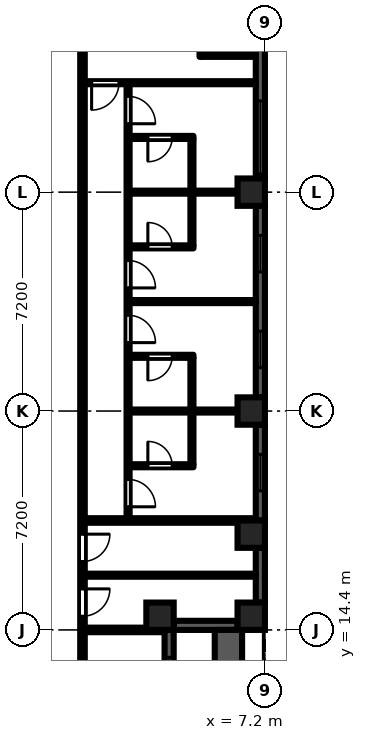
"""IFC4 building model, lengths in metres.
Left out: names, types, materials, properties, quantities, classifications, styles, units other than length and angle.
Written with IfcOpenShell. Run it as: python <this file> out.ifc"""

import sys

from ifc_helpers import new_model, si_unit, direction, frame, frame_2d, origin, origin_2d, place, context, subcontext, project, spatial, rectangle, extrude, element, fill, save


model = new_model("IFC4")
c1 = context("Model", 3, precision=1e-05, world=origin(), true_north=direction((0.0, 1.0)))
c2 = subcontext(c1, "Body", "Model", "MODEL_VIEW")
j1 = project(units=[si_unit("LENGTHUNIT", "METRE"), si_unit("PLANEANGLEUNIT", "RADIAN")], contexts=[c1])
p1 = place(None, origin())
s1 = spatial("IfcSite", under=j1, at=p1, CompositionType="ELEMENT")
p2 = place(p1, origin())
s2 = spatial("IfcBuilding", under=s1, at=p2, CompositionType="ELEMENT")
p3 = place(p2, frame((0.0, 0.0, 59.7)))
s3 = spatial("IfcBuildingStorey", under=s2, at=p3, CompositionType="ELEMENT", Elevation=59.7)
for number, where, z_axis, x_axis in (
    (1, (3.75, 14.85, 0.0), (0.0, 0.0, 1.0), (1.0, 0.0, 0.0)),
    (2, (6.75, 14.85, 0.0), (0.0, 0.0, 1.0), (1.0, 0.0, 0.0)),
    (3, (6.75, 17.55, 0.0), (0.0, 0.0, 1.0), (1.0, 0.0, 0.0)),
    (4, (6.75, 21.6, 0.0), (0.0, 0.0, 1.0), (1.0, 0.0, 0.0)),
    (5, (6.75, 28.8, 0.0), (0.0, 0.0, 1.0), (1.0, 0.0, 0.0)),
):
    element("IfcColumn", number, at=place(p3, frame(where, z_axis=z_axis, x_axis=x_axis)), inside=s3, PredefinedType="COLUMN", context=c2, shape_type="SweptSolid", body=[
        extrude(rectangle(XDim=0.9, YDim=0.9, at=origin_2d()), origin(), (0.0, 0.0, 1.0), 3.0),
    ])
p4 = place(p3, frame((4.05, 7.2, 0.0), z_axis=(0.0, 0.0, 1.0), x_axis=(0.0, 1.0, 0.0)))
e6 = element("IfcWall", 6, at=p4, inside=s3, PredefinedType="SOLIDWALL", context=c2, shape_type="SweptSolid", body=[
    extrude(rectangle(XDim=7.2, YDim=0.3, at=frame_2d((3.6, 0.0))), origin(), (0.0, 0.0, 1.0), 2.55),
])
p5 = place(p4, frame((3.0, 0.0, 0.0)))
e7 = element("IfcOpeningElement", 7, at=p5, cuts=e6, PredefinedType="OPENING", context=c2, shape_type="SweptSolid", body=[
    extrude(rectangle(XDim=1.2, YDim=2.05, at=frame_2d((0.6, 1.025))), frame((0.0, 0.16, 0.0), z_axis=(0.0, -1.0, 0.0), x_axis=(1.0, 0.0, 0.0)), (0.0, 0.0, 1.0), 0.32),
])
p6 = place(p4, frame((0.9, 0.0, 0.2)))
e8 = element("IfcOpeningElement", 8, at=p6, cuts=e6, PredefinedType="OPENING", context=c2, shape_type="SweptSolid", body=[
    extrude(rectangle(XDim=1.8, YDim=1.85, at=frame_2d((0.9, 0.925))), frame((0.0, 0.16, 0.0), z_axis=(0.0, -1.0, 0.0), x_axis=(1.0, 0.0, 0.0)), (0.0, 0.0, 1.0), 0.32),
])
p7 = place(p4, frame((4.5, 0.0, 0.2)))
e9 = element("IfcOpeningElement", 9, at=p7, cuts=e6, PredefinedType="OPENING", context=c2, shape_type="SweptSolid", body=[
    extrude(rectangle(XDim=1.8, YDim=1.85, at=frame_2d((0.9, 0.925))), frame((0.0, 0.16, 0.0), z_axis=(0.0, -1.0, 0.0), x_axis=(1.0, 0.0, 0.0)), (0.0, 0.0, 1.0), 0.32),
])
p8 = place(p3, frame((4.2, 14.55, 0.0), z_axis=(0.0, 0.0, 1.0), x_axis=(1.0, 0.0, 0.0)))
e10 = element("IfcWall", 10, at=p8, inside=s3, PredefinedType="SOLIDWALL", context=c2, shape_type="SweptSolid", body=[
    extrude(rectangle(XDim=2.1, YDim=0.3, at=frame_2d((1.05, 0.0))), origin(), (0.0, 0.0, 1.0), 2.55),
])
p9 = place(p3, frame((7.05, 15.3, 0.0), z_axis=(0.0, 0.0, 1.0), x_axis=(0.0, 1.0, 0.0)))
e11 = element("IfcWall", 11, at=p9, inside=s3, PredefinedType="SOLIDWALL", context=c2, shape_type="SweptSolid", body=[
    extrude(rectangle(XDim=1.8, YDim=0.3, at=frame_2d((0.9, 0.0))), origin(), (0.0, 0.0, 1.0), 2.1),
])
p10 = place(p3, frame((7.05, 18.0, 0.0), z_axis=(0.0, 0.0, 1.0), x_axis=(0.0, 1.0, 0.0)))
e12 = element("IfcWall", 12, at=p10, inside=s3, PredefinedType="SOLIDWALL", context=c2, shape_type="SweptSolid", body=[
    extrude(rectangle(XDim=3.15, YDim=0.3, at=frame_2d((1.575, 0.0))), origin(), (0.0, 0.0, 1.0), 2.1),
])
p11 = place(p10, frame((0.975, 0.0, 0.2)))
e13 = element("IfcOpeningElement", 13, at=p11, cuts=e12, PredefinedType="OPENING", context=c2, shape_type="SweptSolid", body=[
    extrude(rectangle(XDim=1.2, YDim=1.85, at=frame_2d((0.6, 0.925))), frame((0.0, 0.16, 0.0), z_axis=(0.0, -1.0, 0.0), x_axis=(1.0, 0.0, 0.0)), (0.0, 0.0, 1.0), 0.32),
])
p12 = place(p3, frame((7.05, 22.05, 0.0), z_axis=(0.0, 0.0, 1.0), x_axis=(0.0, 1.0, 0.0)))
e14 = element("IfcWall", 14, at=p12, inside=s3, PredefinedType="SOLIDWALL", context=c2, shape_type="SweptSolid", body=[
    extrude(rectangle(XDim=6.3, YDim=0.3, at=frame_2d((3.15, 0.0))), origin(), (0.0, 0.0, 1.0), 2.1),
])
p13 = place(p12, frame((0.975, 0.0, 0.2)))
e15 = element("IfcOpeningElement", 15, at=p13, cuts=e14, PredefinedType="OPENING", context=c2, shape_type="SweptSolid", body=[
    extrude(rectangle(XDim=1.2, YDim=1.85, at=frame_2d((0.6, 0.925))), frame((0.0, 0.16, 0.0), z_axis=(0.0, -1.0, 0.0), x_axis=(1.0, 0.0, 0.0)), (0.0, 0.0, 1.0), 0.32),
])
p14 = place(p12, frame((4.125, 0.0, 0.2)))
e16 = element("IfcOpeningElement", 16, at=p14, cuts=e14, PredefinedType="OPENING", context=c2, shape_type="SweptSolid", body=[
    extrude(rectangle(XDim=1.2, YDim=1.85, at=frame_2d((0.6, 0.925))), frame((0.0, 0.16, 0.0), z_axis=(0.0, -1.0, 0.0), x_axis=(1.0, 0.0, 0.0)), (0.0, 0.0, 1.0), 0.32),
])
p15 = place(p3, frame((7.05, 29.25, 0.0), z_axis=(0.0, 0.0, 1.0), x_axis=(0.0, 1.0, 0.0)))
e17 = element("IfcWall", 17, at=p15, inside=s3, PredefinedType="SOLIDWALL", context=c2, shape_type="SweptSolid", body=[
    extrude(rectangle(XDim=6.3, YDim=0.3, at=frame_2d((3.15, 0.0))), origin(), (0.0, 0.0, 1.0), 2.1),
])
p16 = place(p15, frame((0.15, 0.0, 0.2)))
e18 = element("IfcOpeningElement", 18, at=p16, cuts=e17, PredefinedType="OPENING", context=c2, shape_type="SweptSolid", body=[
    extrude(rectangle(XDim=2.4, YDim=1.85, at=frame_2d((1.2, 0.925))), frame((0.0, 0.16, 0.0), z_axis=(0.0, -1.0, 0.0), x_axis=(1.0, 0.0, 0.0)), (0.0, 0.0, 1.0), 0.32),
])
p17 = place(p3, frame((6.0, 7.2, 0.0), z_axis=(0.0, 0.0, 1.0), x_axis=(0.0, 1.0, 0.0)))
e19 = element("IfcWall", 19, at=p17, inside=s3, PredefinedType="PARAPET", context=c2, shape_type="SweptSolid", body=[
    extrude(rectangle(XDim=7.2, YDim=0.9, at=frame_2d((3.6, 0.0))), origin(), (0.0, 0.0, 1.0), 0.8),
])
p18 = place(p3, frame((1.2, 1.125, 0.0), z_axis=(0.0, 0.0, 1.0), x_axis=(0.0, 1.0, 0.0)))
e20 = element("IfcWall", 20, at=p18, inside=s3, PredefinedType="PARTITIONING", context=c2, shape_type="SweptSolid", body=[
    extrude(rectangle(XDim=35.375, YDim=0.15, at=frame_2d((17.688, 0.0))), origin(), (0.0, 0.0, 1.0), 2.55),
])
p19 = place(p18, frame((2.625, 0.0, 0.0)))
e21 = element("IfcOpeningElement", 21, at=p19, cuts=e20, PredefinedType="OPENING", context=c2, shape_type="SweptSolid", body=[
    extrude(rectangle(XDim=0.9, YDim=2.1, at=frame_2d((0.45, 1.05))), frame((0.0, 0.085, 0.0), z_axis=(0.0, -1.0, 0.0), x_axis=(1.0, 0.0, 0.0)), (0.0, 0.0, 1.0), 0.17),
])
p20 = place(p18, frame((7.425, 0.0, 0.0)))
e22 = element("IfcOpeningElement", 22, at=p20, cuts=e20, PredefinedType="OPENING", context=c2, shape_type="SweptSolid", body=[
    extrude(rectangle(XDim=0.9, YDim=2.1, at=frame_2d((0.45, 1.05))), frame((0.0, 0.085, 0.0), z_axis=(0.0, -1.0, 0.0), x_axis=(1.0, 0.0, 0.0)), (0.0, 0.0, 1.0), 0.17),
])
p21 = place(p18, frame((13.725, 0.0, 0.0)))
e23 = element("IfcOpeningElement", 23, at=p21, cuts=e20, PredefinedType="OPENING", context=c2, shape_type="SweptSolid", body=[
    extrude(rectangle(XDim=0.9, YDim=2.1, at=frame_2d((0.45, 1.05))), frame((0.0, 0.085, 0.0), z_axis=(0.0, -1.0, 0.0), x_axis=(1.0, 0.0, 0.0)), (0.0, 0.0, 1.0), 0.17),
])
p22 = place(p18, frame((15.525, 0.0, 0.0)))
e24 = element("IfcOpeningElement", 24, at=p22, cuts=e20, PredefinedType="OPENING", context=c2, shape_type="SweptSolid", body=[
    extrude(rectangle(XDim=0.9, YDim=2.1, at=frame_2d((0.45, 1.05))), frame((0.0, 0.085, 0.0), z_axis=(0.0, -1.0, 0.0), x_axis=(1.0, 0.0, 0.0)), (0.0, 0.0, 1.0), 0.17),
])
p23 = place(p18, frame((32.825, 0.0, 0.0)))
e25 = element("IfcOpeningElement", 25, at=p23, cuts=e20, PredefinedType="OPENING", context=c2, shape_type="SweptSolid", body=[
    extrude(rectangle(XDim=1.0, YDim=2.1, at=frame_2d((0.5, 1.05))), frame((0.0, 0.085, 0.0), z_axis=(0.0, -1.0, 0.0), x_axis=(1.0, 0.0, 0.0)), (0.0, 0.0, 1.0), 0.17),
])
p24 = place(p3, frame((1.275, 14.4, 0.0), z_axis=(0.0, 0.0, 1.0), x_axis=(1.0, 0.0, 0.0)))
e26 = element("IfcWall", 26, at=p24, inside=s3, PredefinedType="PARTITIONING", context=c2, shape_type="SweptSolid", body=[
    extrude(rectangle(XDim=2.625, YDim=0.15, at=frame_2d((1.312, 0.0))), origin(), (0.0, 0.0, 1.0), 2.55),
])
p25 = place(p3, frame((1.275, 16.2, 0.0), z_axis=(0.0, 0.0, 1.0), x_axis=(1.0, 0.0, 0.0)))
e27 = element("IfcWall", 27, at=p25, inside=s3, PredefinedType="PARTITIONING", context=c2, shape_type="SweptSolid", body=[
    extrude(rectangle(XDim=5.625, YDim=0.1, at=frame_2d((2.812, 0.0))), origin(), (0.0, 0.0, 1.0), 2.55),
])
p26 = place(p3, frame((1.275, 18.0, 0.0), z_axis=(0.0, 0.0, 1.0), x_axis=(1.0, 0.0, 0.0)))
e28 = element("IfcWall", 28, at=p26, inside=s3, PredefinedType="PARTITIONING", context=c2, shape_type="SweptSolid", body=[
    extrude(rectangle(XDim=5.625, YDim=0.15, at=frame_2d((2.812, 0.0))), origin(), (0.0, 0.0, 1.0), 2.55),
])
p27 = place(p3, frame((1.275, 32.4, 0.0), z_axis=(0.0, 0.0, 1.0), x_axis=(1.0, 0.0, 0.0)))
e29 = element("IfcWall", 29, at=p27, inside=s3, PredefinedType="PARTITIONING", context=c2, shape_type="SweptSolid", body=[
    extrude(rectangle(XDim=5.625, YDim=0.1, at=frame_2d((2.812, 0.0))), origin(), (0.0, 0.0, 1.0), 2.55),
])
p28 = place(p27, frame((0.225, 0.0, 0.0)))
e30 = element("IfcOpeningElement", 30, at=p28, cuts=e29, PredefinedType="OPENING", context=c2, shape_type="SweptSolid", body=[
    extrude(rectangle(XDim=0.9, YDim=2.1, at=frame_2d((0.45, 1.05))), frame((0.0, 0.06, 0.0), z_axis=(0.0, -1.0, 0.0), x_axis=(1.0, 0.0, 0.0)), (0.0, 0.0, 1.0), 0.12),
])
p29 = place(p3, frame((2.7, 18.075, 0.0), z_axis=(0.0, 0.0, 1.0), x_axis=(0.0, 1.0, 0.0)))
e31 = element("IfcWall", 31, at=p29, inside=s3, PredefinedType="PARTITIONING", context=c2, shape_type="SweptSolid", body=[
    extrude(rectangle(XDim=14.275, YDim=0.1, at=frame_2d((7.138, 0.0))), origin(), (0.0, 0.0, 1.0), 2.55),
])
p30 = place(p29, frame((0.375, 0.0, 0.0)))
e32 = element("IfcOpeningElement", 32, at=p30, cuts=e31, PredefinedType="OPENING", context=c2, shape_type="SweptSolid", body=[
    extrude(rectangle(XDim=0.9, YDim=2.1, at=frame_2d((0.45, 1.05))), frame((0.0, 0.06, 0.0), z_axis=(0.0, -1.0, 0.0), x_axis=(1.0, 0.0, 0.0)), (0.0, 0.0, 1.0), 0.12),
])
p31 = place(p29, frame((5.775, 0.0, 0.0)))
e33 = element("IfcOpeningElement", 33, at=p31, cuts=e31, PredefinedType="OPENING", context=c2, shape_type="SweptSolid", body=[
    extrude(rectangle(XDim=0.9, YDim=2.1, at=frame_2d((0.45, 1.05))), frame((0.0, 0.06, 0.0), z_axis=(0.0, -1.0, 0.0), x_axis=(1.0, 0.0, 0.0)), (0.0, 0.0, 1.0), 0.12),
])
p32 = place(p29, frame((7.575, 0.0, 0.0)))
e34 = element("IfcOpeningElement", 34, at=p32, cuts=e31, PredefinedType="OPENING", context=c2, shape_type="SweptSolid", body=[
    extrude(rectangle(XDim=0.9, YDim=2.1, at=frame_2d((0.45, 1.05))), frame((0.0, 0.06, 0.0), z_axis=(0.0, -1.0, 0.0), x_axis=(1.0, 0.0, 0.0)), (0.0, 0.0, 1.0), 0.12),
])
p33 = place(p29, frame((12.975, 0.0, 0.0)))
e35 = element("IfcOpeningElement", 35, at=p33, cuts=e31, PredefinedType="OPENING", context=c2, shape_type="SweptSolid", body=[
    extrude(rectangle(XDim=0.9, YDim=2.1, at=frame_2d((0.45, 1.05))), frame((0.0, 0.06, 0.0), z_axis=(0.0, -1.0, 0.0), x_axis=(1.0, 0.0, 0.0)), (0.0, 0.0, 1.0), 0.12),
])
p34 = place(p3, frame((2.75, 19.8, 0.0), z_axis=(0.0, 0.0, 1.0), x_axis=(1.0, 0.0, 0.0)))
e36 = element("IfcWall", 36, at=p34, inside=s3, PredefinedType="PARTITIONING", context=c2, shape_type="SweptSolid", body=[
    extrude(rectangle(XDim=2.1, YDim=0.1, at=frame_2d((1.05, 0.0))), origin(), (0.0, 0.0, 1.0), 2.55),
])
p35 = place(p34, frame((0.6, 0.0, 0.0)))
e37 = element("IfcOpeningElement", 37, at=p35, cuts=e36, PredefinedType="OPENING", context=c2, shape_type="SweptSolid", body=[
    extrude(rectangle(XDim=0.8, YDim=2.1, at=frame_2d((0.4, 1.05))), frame((0.0, 0.06, 0.0), z_axis=(0.0, -1.0, 0.0), x_axis=(1.0, 0.0, 0.0)), (0.0, 0.0, 1.0), 0.12),
])
p36 = place(p3, frame((2.75, 21.6, 0.0), z_axis=(0.0, 0.0, 1.0), x_axis=(1.0, 0.0, 0.0)))
e38 = element("IfcWall", 38, at=p36, inside=s3, PredefinedType="PARTITIONING", context=c2, shape_type="SweptSolid", body=[
    extrude(rectangle(XDim=4.15, YDim=0.1, at=frame_2d((2.075, 0.0))), origin(), (0.0, 0.0, 1.0), 2.55),
])
p37 = place(p3, frame((2.75, 23.4, 0.0), z_axis=(0.0, 0.0, 1.0), x_axis=(1.0, 0.0, 0.0)))
e39 = element("IfcWall", 39, at=p37, inside=s3, PredefinedType="PARTITIONING", context=c2, shape_type="SweptSolid", body=[
    extrude(rectangle(XDim=2.1, YDim=0.1, at=frame_2d((1.05, 0.0))), origin(), (0.0, 0.0, 1.0), 2.55),
])
p38 = place(p37, frame((0.6, 0.0, 0.0)))
e40 = element("IfcOpeningElement", 40, at=p38, cuts=e39, PredefinedType="OPENING", context=c2, shape_type="SweptSolid", body=[
    extrude(rectangle(XDim=0.8, YDim=2.1, at=frame_2d((0.4, 1.05))), frame((0.0, 0.06, 0.0), z_axis=(0.0, -1.0, 0.0), x_axis=(1.0, 0.0, 0.0)), (0.0, 0.0, 1.0), 0.12),
])
p39 = place(p3, frame((2.75, 25.2, 0.0), z_axis=(0.0, 0.0, 1.0), x_axis=(1.0, 0.0, 0.0)))
e41 = element("IfcWall", 41, at=p39, inside=s3, PredefinedType="PARTITIONING", context=c2, shape_type="SweptSolid", body=[
    extrude(rectangle(XDim=4.15, YDim=0.1, at=frame_2d((2.075, 0.0))), origin(), (0.0, 0.0, 1.0), 2.55),
])
p40 = place(p3, frame((2.75, 27.0, 0.0), z_axis=(0.0, 0.0, 1.0), x_axis=(1.0, 0.0, 0.0)))
e42 = element("IfcWall", 42, at=p40, inside=s3, PredefinedType="PARTITIONING", context=c2, shape_type="SweptSolid", body=[
    extrude(rectangle(XDim=2.1, YDim=0.1, at=frame_2d((1.05, 0.0))), origin(), (0.0, 0.0, 1.0), 2.55),
])
p41 = place(p40, frame((0.6, 0.0, 0.0)))
e43 = element("IfcOpeningElement", 43, at=p41, cuts=e42, PredefinedType="OPENING", context=c2, shape_type="SweptSolid", body=[
    extrude(rectangle(XDim=0.8, YDim=2.1, at=frame_2d((0.4, 1.05))), frame((0.0, 0.06, 0.0), z_axis=(0.0, -1.0, 0.0), x_axis=(1.0, 0.0, 0.0)), (0.0, 0.0, 1.0), 0.12),
])
p42 = place(p3, frame((2.75, 28.8, 0.0), z_axis=(0.0, 0.0, 1.0), x_axis=(1.0, 0.0, 0.0)))
e44 = element("IfcWall", 44, at=p42, inside=s3, PredefinedType="PARTITIONING", context=c2, shape_type="SweptSolid", body=[
    extrude(rectangle(XDim=4.15, YDim=0.1, at=frame_2d((2.075, 0.0))), origin(), (0.0, 0.0, 1.0), 2.55),
])
p43 = place(p3, frame((2.75, 30.6, 0.0), z_axis=(0.0, 0.0, 1.0), x_axis=(1.0, 0.0, 0.0)))
e45 = element("IfcWall", 45, at=p43, inside=s3, PredefinedType="PARTITIONING", context=c2, shape_type="SweptSolid", body=[
    extrude(rectangle(XDim=2.1, YDim=0.1, at=frame_2d((1.05, 0.0))), origin(), (0.0, 0.0, 1.0), 2.55),
])
p44 = place(p43, frame((0.6, 0.0, 0.0)))
e46 = element("IfcOpeningElement", 46, at=p44, cuts=e45, PredefinedType="OPENING", context=c2, shape_type="SweptSolid", body=[
    extrude(rectangle(XDim=0.8, YDim=2.1, at=frame_2d((0.4, 1.05))), frame((0.0, 0.06, 0.0), z_axis=(0.0, -1.0, 0.0), x_axis=(1.0, 0.0, 0.0)), (0.0, 0.0, 1.0), 0.12),
])
for number, where, z_axis, x_axis in (
    (47, (4.8, 19.85, 0.0), (0.0, 0.0, 1.0), (0.0, 1.0, 0.0)),
    (48, (4.8, 27.05, 0.0), (0.0, 0.0, 1.0), (0.0, 1.0, 0.0)),
):
    element("IfcWall", number, at=place(p3, frame(where, z_axis=z_axis, x_axis=x_axis)), inside=s3, PredefinedType="PARTITIONING", context=c2, shape_type="SweptSolid", body=[
        extrude(rectangle(XDim=3.5, YDim=0.1, at=frame_2d((1.75, 0.0))), origin(), (0.0, 0.0, 1.0), 2.55),
    ])
p45 = place(p3, frame((5.1, 33.25, 0.0), z_axis=(0.0, 0.0, 1.0), x_axis=(0.0, 1.0, 0.0)))
e49 = element("IfcWall", 49, at=p45, inside=s3, PredefinedType="PARTITIONING", context=c2, shape_type="SweptSolid", body=[
    extrude(rectangle(XDim=1.9, YDim=0.1, at=frame_2d((0.95, 0.0))), origin(), (0.0, 0.0, 1.0), 2.55),
])
p46 = place(p45, frame((0.55, 0.0, 0.0)))
e50 = element("IfcOpeningElement", 50, at=p46, cuts=e49, PredefinedType="OPENING", context=c2, shape_type="SweptSolid", body=[
    extrude(rectangle(XDim=0.8, YDim=2.1, at=frame_2d((0.4, 1.05))), frame((0.0, 0.06, 0.0), z_axis=(0.0, -1.0, 0.0), x_axis=(1.0, 0.0, 0.0)), (0.0, 0.0, 1.0), 0.12),
])
p47 = place(p3, frame((5.15, 33.3, 0.0), z_axis=(0.0, 0.0, 1.0), x_axis=(1.0, 0.0, 0.0)))
e51 = element("IfcWall", 51, at=p47, inside=s3, PredefinedType="PARTITIONING", context=c2, shape_type="SweptSolid", body=[
    extrude(rectangle(XDim=1.75, YDim=0.1, at=frame_2d((0.875, 0.0))), origin(), (0.0, 0.0, 1.0), 2.55),
])
p48 = place(p7, origin())
e52 = element("IfcWindow", 52, at=p48, inside=s3, PartitioningType="SINGLE_PANEL", PredefinedType="WINDOW", context=c2, shape_type="SweptSolid", body=[
    extrude(rectangle(XDim=1.8, YDim=1.85, at=frame_2d((0.9, 0.925))), frame((0.0, 0.03, 0.0), z_axis=(0.0, -1.0, 0.0), x_axis=(1.0, 0.0, 0.0)), (0.0, 0.0, 1.0), 0.06),
])
fill(e9, e52)
p49 = place(p11, origin())
e53 = element("IfcWindow", 53, at=p49, inside=s3, PartitioningType="SINGLE_PANEL", PredefinedType="WINDOW", context=c2, shape_type="SweptSolid", body=[
    extrude(rectangle(XDim=1.2, YDim=1.85, at=frame_2d((0.6, 0.925))), frame((0.0, 0.03, 0.0), z_axis=(0.0, -1.0, 0.0), x_axis=(1.0, 0.0, 0.0)), (0.0, 0.0, 1.0), 0.06),
])
fill(e13, e53)
p50 = place(p13, origin())
e54 = element("IfcWindow", 54, at=p50, inside=s3, PartitioningType="SINGLE_PANEL", PredefinedType="WINDOW", context=c2, shape_type="SweptSolid", body=[
    extrude(rectangle(XDim=1.2, YDim=1.85, at=frame_2d((0.6, 0.925))), frame((0.0, 0.03, 0.0), z_axis=(0.0, -1.0, 0.0), x_axis=(1.0, 0.0, 0.0)), (0.0, 0.0, 1.0), 0.06),
])
fill(e15, e54)
p51 = place(p14, origin())
e55 = element("IfcWindow", 55, at=p51, inside=s3, PartitioningType="SINGLE_PANEL", PredefinedType="WINDOW", context=c2, shape_type="SweptSolid", body=[
    extrude(rectangle(XDim=1.2, YDim=1.85, at=frame_2d((0.6, 0.925))), frame((0.0, 0.03, 0.0), z_axis=(0.0, -1.0, 0.0), x_axis=(1.0, 0.0, 0.0)), (0.0, 0.0, 1.0), 0.06),
])
fill(e16, e55)
p52 = place(p16, origin())
e56 = element("IfcWindow", 56, at=p52, inside=s3, PartitioningType="SINGLE_PANEL", PredefinedType="WINDOW", context=c2, shape_type="SweptSolid", body=[
    extrude(rectangle(XDim=2.4, YDim=1.85, at=frame_2d((1.2, 0.925))), frame((0.0, 0.03, 0.0), z_axis=(0.0, -1.0, 0.0), x_axis=(1.0, 0.0, 0.0)), (0.0, 0.0, 1.0), 0.06),
])
fill(e18, e56)
p53 = place(p21, frame((0.9, 0.0, 0.0), z_axis=(0.0, 0.0, 1.0), x_axis=(-1.0, 0.0, 0.0)))
e57 = element("IfcDoor", 57, at=p53, inside=s3, OperationType="SINGLE_SWING_LEFT", PredefinedType="DOOR", context=c2, shape_type="SweptSolid", body=[
    extrude(rectangle(XDim=0.9, YDim=2.1, at=frame_2d((0.45, 1.05))), frame((0.0, 0.025, 0.0), z_axis=(0.0, -1.0, 0.0), x_axis=(1.0, 0.0, 0.0)), (0.0, 0.0, 1.0), 0.05),
])
fill(e23, e57)
p54 = place(p22, frame((0.9, 0.0, 0.0), z_axis=(0.0, 0.0, 1.0), x_axis=(-1.0, 0.0, 0.0)))
e58 = element("IfcDoor", 58, at=p54, inside=s3, OperationType="SINGLE_SWING_LEFT", PredefinedType="DOOR", context=c2, shape_type="SweptSolid", body=[
    extrude(rectangle(XDim=0.9, YDim=2.1, at=frame_2d((0.45, 1.05))), frame((0.0, 0.025, 0.0), z_axis=(0.0, -1.0, 0.0), x_axis=(1.0, 0.0, 0.0)), (0.0, 0.0, 1.0), 0.05),
])
fill(e24, e58)
p55 = place(p28, frame((0.9, 0.0, 0.0), z_axis=(0.0, 0.0, 1.0), x_axis=(-1.0, 0.0, 0.0)))
e59 = element("IfcDoor", 59, at=p55, inside=s3, OperationType="SINGLE_SWING_RIGHT", PredefinedType="DOOR", context=c2, shape_type="SweptSolid", body=[
    extrude(rectangle(XDim=0.9, YDim=2.1, at=frame_2d((0.45, 1.05))), frame((0.0, 0.025, 0.0), z_axis=(0.0, -1.0, 0.0), x_axis=(1.0, 0.0, 0.0)), (0.0, 0.0, 1.0), 0.05),
])
fill(e30, e59)
p56 = place(p30, frame((0.9, 0.0, 0.0), z_axis=(0.0, 0.0, 1.0), x_axis=(-1.0, 0.0, 0.0)))
e60 = element("IfcDoor", 60, at=p56, inside=s3, OperationType="SINGLE_SWING_RIGHT", PredefinedType="DOOR", context=c2, shape_type="SweptSolid", body=[
    extrude(rectangle(XDim=0.9, YDim=2.1, at=frame_2d((0.45, 1.05))), frame((0.0, 0.025, 0.0), z_axis=(0.0, -1.0, 0.0), x_axis=(1.0, 0.0, 0.0)), (0.0, 0.0, 1.0), 0.05),
])
fill(e32, e60)
p57 = place(p31, frame((0.9, 0.0, 0.0), z_axis=(0.0, 0.0, 1.0), x_axis=(-1.0, 0.0, 0.0)))
e61 = element("IfcDoor", 61, at=p57, inside=s3, OperationType="SINGLE_SWING_RIGHT", PredefinedType="DOOR", context=c2, shape_type="SweptSolid", body=[
    extrude(rectangle(XDim=0.9, YDim=2.1, at=frame_2d((0.45, 1.05))), frame((0.0, 0.025, 0.0), z_axis=(0.0, -1.0, 0.0), x_axis=(1.0, 0.0, 0.0)), (0.0, 0.0, 1.0), 0.05),
])
fill(e33, e61)
p58 = place(p32, frame((0.9, 0.0, 0.0), z_axis=(0.0, 0.0, 1.0), x_axis=(-1.0, 0.0, 0.0)))
e62 = element("IfcDoor", 62, at=p58, inside=s3, OperationType="SINGLE_SWING_RIGHT", PredefinedType="DOOR", context=c2, shape_type="SweptSolid", body=[
    extrude(rectangle(XDim=0.9, YDim=2.1, at=frame_2d((0.45, 1.05))), frame((0.0, 0.025, 0.0), z_axis=(0.0, -1.0, 0.0), x_axis=(1.0, 0.0, 0.0)), (0.0, 0.0, 1.0), 0.05),
])
fill(e34, e62)
p59 = place(p33, frame((0.9, 0.0, 0.0), z_axis=(0.0, 0.0, 1.0), x_axis=(-1.0, 0.0, 0.0)))
e63 = element("IfcDoor", 63, at=p59, inside=s3, OperationType="SINGLE_SWING_RIGHT", PredefinedType="DOOR", context=c2, shape_type="SweptSolid", body=[
    extrude(rectangle(XDim=0.9, YDim=2.1, at=frame_2d((0.45, 1.05))), frame((0.0, 0.025, 0.0), z_axis=(0.0, -1.0, 0.0), x_axis=(1.0, 0.0, 0.0)), (0.0, 0.0, 1.0), 0.05),
])
fill(e35, e63)
p60 = place(p35, origin())
e64 = element("IfcDoor", 64, at=p60, inside=s3, OperationType="SINGLE_SWING_LEFT", PredefinedType="DOOR", context=c2, shape_type="SweptSolid", body=[
    extrude(rectangle(XDim=0.8, YDim=2.1, at=frame_2d((0.4, 1.05))), frame((0.0, 0.025, 0.0), z_axis=(0.0, -1.0, 0.0), x_axis=(1.0, 0.0, 0.0)), (0.0, 0.0, 1.0), 0.05),
])
fill(e37, e64)
p61 = place(p38, frame((0.8, 0.0, 0.0), z_axis=(0.0, 0.0, 1.0), x_axis=(-1.0, 0.0, 0.0)))
e65 = element("IfcDoor", 65, at=p61, inside=s3, OperationType="SINGLE_SWING_RIGHT", PredefinedType="DOOR", context=c2, shape_type="SweptSolid", body=[
    extrude(rectangle(XDim=0.8, YDim=2.1, at=frame_2d((0.4, 1.05))), frame((0.0, 0.025, 0.0), z_axis=(0.0, -1.0, 0.0), x_axis=(1.0, 0.0, 0.0)), (0.0, 0.0, 1.0), 0.05),
])
fill(e40, e65)
p62 = place(p41, origin())
e66 = element("IfcDoor", 66, at=p62, inside=s3, OperationType="SINGLE_SWING_LEFT", PredefinedType="DOOR", context=c2, shape_type="SweptSolid", body=[
    extrude(rectangle(XDim=0.8, YDim=2.1, at=frame_2d((0.4, 1.05))), frame((0.0, 0.025, 0.0), z_axis=(0.0, -1.0, 0.0), x_axis=(1.0, 0.0, 0.0)), (0.0, 0.0, 1.0), 0.05),
])
fill(e43, e66)
p63 = place(p44, frame((0.8, 0.0, 0.0), z_axis=(0.0, 0.0, 1.0), x_axis=(-1.0, 0.0, 0.0)))
e67 = element("IfcDoor", 67, at=p63, inside=s3, OperationType="SINGLE_SWING_RIGHT", PredefinedType="DOOR", context=c2, shape_type="SweptSolid", body=[
    extrude(rectangle(XDim=0.8, YDim=2.1, at=frame_2d((0.4, 1.05))), frame((0.0, 0.025, 0.0), z_axis=(0.0, -1.0, 0.0), x_axis=(1.0, 0.0, 0.0)), (0.0, 0.0, 1.0), 0.05),
])
fill(e46, e67)
save(model, sys.argv[1])
